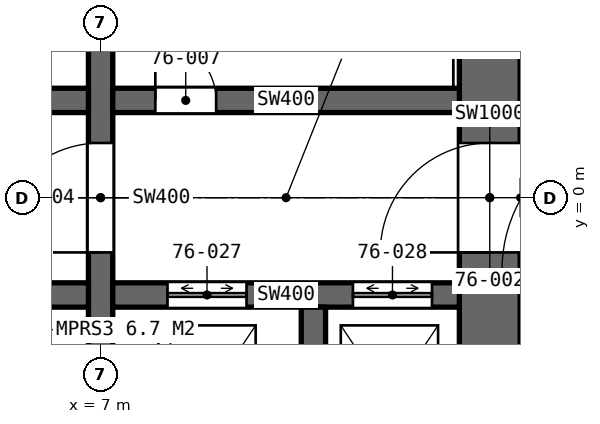
"""IFC4 building model, lengths in metres.
Left out: names, types, materials, properties, quantities, classifications, styles, units other than length and angle.
Written with IfcOpenShell. Run it as: python <this file> out.ifc"""

import sys

from ifc_helpers import new_model, si_unit, direction, frame, frame_2d, origin, place, context, subcontext, project, spatial, rectangle, extrude, element, fill, save


model = new_model("IFC4")
c1 = context("Model", 3, precision=1e-05, world=origin(), true_north=direction((0.0, 1.0)))
c2 = subcontext(c1, "Body", "Model", "MODEL_VIEW")
j1 = project(units=[si_unit("LENGTHUNIT", "METRE"), si_unit("PLANEANGLEUNIT", "RADIAN")], contexts=[c1])
p1 = place(None, origin())
s1 = spatial("IfcSite", under=j1, at=p1, CompositionType="ELEMENT")
p2 = place(p1, origin())
s2 = spatial("IfcBuilding", under=s1, at=p2, CompositionType="ELEMENT")
p3 = place(p2, frame((0.0, 0.0, 339.2)))
s3 = spatial("IfcBuildingStorey", under=s2, at=p3, CompositionType="ELEMENT", Elevation=339.2)
p4 = place(p3, frame((13.4, -8.9, 0.0), z_axis=(0.0, 0.0, 1.0), x_axis=(0.0, 1.0, 0.0)))
e1 = element("IfcWall", 1, at=p4, inside=s3, PredefinedType="SHEAR", context=c2, shape_type="SweptSolid", body=[
    extrude(rectangle(XDim=17.8, YDim=1.0, at=frame_2d((8.9, 0.0))), origin(), (0.0, 0.0, 1.0), 5.0),
])
p5 = place(p4, frame((8.0, 0.0, 0.0)))
e2 = element("IfcOpeningElement", 2, at=p5, cuts=e1, PredefinedType="OPENING", context=c2, shape_type="SweptSolid", body=[
    extrude(rectangle(XDim=1.8, YDim=2.4, at=frame_2d((0.9, 1.2))), frame((0.0, 0.51, 0.0), z_axis=(0.0, -1.0, 0.0), x_axis=(1.0, 0.0, 0.0)), (0.0, 0.0, 1.0), 1.02),
])
p6 = place(p3, frame((7.0, -8.9, 0.0), z_axis=(0.0, 0.0, 1.0), x_axis=(0.0, 1.0, 0.0)))
e3 = element("IfcWall", 3, at=p6, inside=s3, PredefinedType="SHEAR", context=c2, shape_type="SweptSolid", body=[
    extrude(rectangle(XDim=17.8, YDim=0.4, at=frame_2d((8.9, 0.0))), origin(), (0.0, 0.0, 1.0), 5.0),
])
p7 = place(p6, frame((8.0, 0.0, 0.0)))
e4 = element("IfcOpeningElement", 4, at=p7, cuts=e3, PredefinedType="OPENING", context=c2, shape_type="SweptSolid", body=[
    extrude(rectangle(XDim=1.8, YDim=2.4, at=frame_2d((0.9, 1.2))), frame((0.0, 0.21, 0.0), z_axis=(0.0, -1.0, 0.0), x_axis=(1.0, 0.0, 0.0)), (0.0, 0.0, 1.0), 0.42),
])
p8 = place(p3, frame((-6.8, 1.6, 0.0), z_axis=(0.0, 0.0, 1.0), x_axis=(1.0, 0.0, 0.0)))
e5 = element("IfcWall", 5, at=p8, inside=s3, PredefinedType="SHEAR", context=c2, shape_type="SweptSolid", body=[
    extrude(rectangle(XDim=13.6, YDim=0.4, at=frame_2d((6.8, 0.0))), origin(), (0.0, 0.0, 1.0), 5.0),
])
p9 = place(p8, frame((0.765, 0.0, 0.0)))
e6 = element("IfcOpeningElement", 6, at=p9, cuts=e5, PredefinedType="OPENING", context=c2, shape_type="SweptSolid", body=[
    extrude(rectangle(XDim=1.0, YDim=2.4, at=frame_2d((0.5, 1.2))), frame((0.0, 0.21, 0.0), z_axis=(0.0, -1.0, 0.0), x_axis=(1.0, 0.0, 0.0)), (0.0, 0.0, 1.0), 0.42),
])
p10 = place(p8, frame((3.5, 0.0, 0.0)))
e7 = element("IfcOpeningElement", 7, at=p10, cuts=e5, PredefinedType="OPENING", context=c2, shape_type="SweptSolid", body=[
    extrude(rectangle(XDim=1.0, YDim=2.4, at=frame_2d((0.5, 1.2))), frame((0.0, 0.21, 0.0), z_axis=(0.0, -1.0, 0.0), x_axis=(1.0, 0.0, 0.0)), (0.0, 0.0, 1.0), 0.42),
])
p11 = place(p8, frame((6.3, 0.0, 0.0)))
e8 = element("IfcOpeningElement", 8, at=p11, cuts=e5, PredefinedType="OPENING", context=c2, shape_type="SweptSolid", body=[
    extrude(rectangle(XDim=1.0, YDim=2.4, at=frame_2d((0.5, 1.2))), frame((0.0, 0.21, 0.0), z_axis=(0.0, -1.0, 0.0), x_axis=(1.0, 0.0, 0.0)), (0.0, 0.0, 1.0), 0.42),
])
p12 = place(p8, frame((9.035, 0.0, 0.0)))
e9 = element("IfcOpeningElement", 9, at=p12, cuts=e5, PredefinedType="OPENING", context=c2, shape_type="SweptSolid", body=[
    extrude(rectangle(XDim=1.0, YDim=2.4, at=frame_2d((0.5, 1.2))), frame((0.0, 0.21, 0.0), z_axis=(0.0, -1.0, 0.0), x_axis=(1.0, 0.0, 0.0)), (0.0, 0.0, 1.0), 0.42),
])
p13 = place(p8, frame((11.9, 0.0, 0.0)))
e10 = element("IfcOpeningElement", 10, at=p13, cuts=e5, PredefinedType="OPENING", context=c2, shape_type="SweptSolid", body=[
    extrude(rectangle(XDim=1.0, YDim=2.4, at=frame_2d((0.5, 1.2))), frame((0.0, 0.21, 0.0), z_axis=(0.0, -1.0, 0.0), x_axis=(1.0, 0.0, 0.0)), (0.0, 0.0, 1.0), 0.42),
])
p14 = place(p3, frame((-6.8, -1.6, 0.0), z_axis=(0.0, 0.0, 1.0), x_axis=(1.0, 0.0, 0.0)))
e11 = element("IfcWall", 11, at=p14, inside=s3, PredefinedType="SHEAR", context=c2, shape_type="SweptSolid", body=[
    extrude(rectangle(XDim=13.6, YDim=0.4, at=frame_2d((6.8, 0.0))), origin(), (0.0, 0.0, 1.0), 5.0),
])
p15 = place(p14, frame((0.765, 0.0, 0.0)))
e12 = element("IfcOpeningElement", 12, at=p15, cuts=e11, PredefinedType="OPENING", context=c2, shape_type="SweptSolid", body=[
    extrude(rectangle(XDim=1.0, YDim=2.4, at=frame_2d((0.5, 1.2))), frame((0.0, 0.21, 0.0), z_axis=(0.0, -1.0, 0.0), x_axis=(1.0, 0.0, 0.0)), (0.0, 0.0, 1.0), 0.42),
])
p16 = place(p14, frame((3.5, 0.0, 0.0)))
e13 = element("IfcOpeningElement", 13, at=p16, cuts=e11, PredefinedType="OPENING", context=c2, shape_type="SweptSolid", body=[
    extrude(rectangle(XDim=1.0, YDim=2.4, at=frame_2d((0.5, 1.2))), frame((0.0, 0.21, 0.0), z_axis=(0.0, -1.0, 0.0), x_axis=(1.0, 0.0, 0.0)), (0.0, 0.0, 1.0), 0.42),
])
p17 = place(p14, frame((6.3, 0.0, 0.0)))
e14 = element("IfcOpeningElement", 14, at=p17, cuts=e11, PredefinedType="OPENING", context=c2, shape_type="SweptSolid", body=[
    extrude(rectangle(XDim=1.0, YDim=2.4, at=frame_2d((0.5, 1.2))), frame((0.0, 0.21, 0.0), z_axis=(0.0, -1.0, 0.0), x_axis=(1.0, 0.0, 0.0)), (0.0, 0.0, 1.0), 0.42),
])
p18 = place(p14, frame((9.035, 0.0, 0.0)))
e15 = element("IfcOpeningElement", 15, at=p18, cuts=e11, PredefinedType="OPENING", context=c2, shape_type="SweptSolid", body=[
    extrude(rectangle(XDim=1.0, YDim=2.4, at=frame_2d((0.5, 1.2))), frame((0.0, 0.21, 0.0), z_axis=(0.0, -1.0, 0.0), x_axis=(1.0, 0.0, 0.0)), (0.0, 0.0, 1.0), 0.42),
])
p19 = place(p14, frame((11.9, 0.0, 0.0)))
e16 = element("IfcOpeningElement", 16, at=p19, cuts=e11, PredefinedType="OPENING", context=c2, shape_type="SweptSolid", body=[
    extrude(rectangle(XDim=1.0, YDim=2.4, at=frame_2d((0.5, 1.2))), frame((0.0, 0.21, 0.0), z_axis=(0.0, -1.0, 0.0), x_axis=(1.0, 0.0, 0.0)), (0.0, 0.0, 1.0), 0.42),
])
p20 = place(p3, frame((7.2, 1.6, 0.0), z_axis=(0.0, 0.0, 1.0), x_axis=(1.0, 0.0, 0.0)))
e17 = element("IfcWall", 17, at=p20, inside=s3, PredefinedType="SHEAR", context=c2, shape_type="SweptSolid", body=[
    extrude(rectangle(XDim=5.7, YDim=0.4, at=frame_2d((2.85, 0.0))), origin(), (0.0, 0.0, 1.0), 5.0),
])
p21 = place(p20, frame((0.7, 0.0, 0.0)))
e18 = element("IfcOpeningElement", 18, at=p21, cuts=e17, PredefinedType="OPENING", context=c2, shape_type="SweptSolid", body=[
    extrude(rectangle(XDim=1.0, YDim=2.4, at=frame_2d((0.5, 1.2))), frame((0.0, 0.21, 0.0), z_axis=(0.0, -1.0, 0.0), x_axis=(1.0, 0.0, 0.0)), (0.0, 0.0, 1.0), 0.42),
])
p22 = place(p3, frame((7.2, -1.6, 0.0), z_axis=(0.0, 0.0, 1.0), x_axis=(1.0, 0.0, 0.0)))
e19 = element("IfcWall", 19, at=p22, inside=s3, PredefinedType="SHEAR", context=c2, shape_type="SweptSolid", body=[
    extrude(rectangle(XDim=5.7, YDim=0.4, at=frame_2d((2.85, 0.0))), origin(), (0.0, 0.0, 1.0), 5.0),
])
p23 = place(p22, frame((0.9, 0.0, 0.0)))
e20 = element("IfcOpeningElement", 20, at=p23, cuts=e19, PredefinedType="OPENING", context=c2, shape_type="SweptSolid", body=[
    extrude(rectangle(XDim=1.3, YDim=2.4, at=frame_2d((0.65, 1.2))), frame((0.0, 0.21, 0.0), z_axis=(0.0, -1.0, 0.0), x_axis=(1.0, 0.0, 0.0)), (0.0, 0.0, 1.0), 0.42),
])
p24 = place(p22, frame((3.95, 0.0, 0.0)))
e21 = element("IfcOpeningElement", 21, at=p24, cuts=e19, PredefinedType="OPENING", context=c2, shape_type="SweptSolid", body=[
    extrude(rectangle(XDim=1.3, YDim=2.4, at=frame_2d((0.65, 1.2))), frame((0.0, 0.21, 0.0), z_axis=(0.0, -1.0, 0.0), x_axis=(1.0, 0.0, 0.0)), (0.0, 0.0, 1.0), 0.42),
])
p25 = place(p3, frame((10.5, -4.8, 0.0), z_axis=(0.0, 0.0, 1.0), x_axis=(0.0, 1.0, 0.0)))
e22 = element("IfcWall", 22, at=p25, inside=s3, PredefinedType="SHEAR", context=c2, shape_type="SweptSolid", body=[
    extrude(rectangle(XDim=3.0, YDim=0.4, at=frame_2d((1.5, 0.0))), origin(), (0.0, 0.0, 1.0), 5.0),
])
p26 = place(p5, origin())
e23 = element("IfcDoor", 23, at=p26, inside=s3, OperationType="DOUBLE_DOOR_SINGLE_SWING", PredefinedType="DOOR", context=c2, shape_type="SweptSolid", body=[
    extrude(rectangle(XDim=1.8, YDim=2.4, at=frame_2d((0.9, 1.2))), frame((0.0, 0.025, 0.0), z_axis=(0.0, -1.0, 0.0), x_axis=(1.0, 0.0, 0.0)), (0.0, 0.0, 1.0), 0.05),
])
fill(e2, e23)
p27 = place(p7, origin())
e24 = element("IfcDoor", 24, at=p27, inside=s3, OperationType="DOUBLE_DOOR_SINGLE_SWING", PredefinedType="DOOR", context=c2, shape_type="SweptSolid", body=[
    extrude(rectangle(XDim=1.8, YDim=2.4, at=frame_2d((0.9, 1.2))), frame((0.0, 0.025, 0.0), z_axis=(0.0, -1.0, 0.0), x_axis=(1.0, 0.0, 0.0)), (0.0, 0.0, 1.0), 0.05),
])
fill(e4, e24)
p28 = place(p21, origin())
e25 = element("IfcDoor", 25, at=p28, inside=s3, OperationType="SINGLE_SWING_LEFT", PredefinedType="DOOR", context=c2, shape_type="SweptSolid", body=[
    extrude(rectangle(XDim=1.0, YDim=2.4, at=frame_2d((0.5, 1.2))), frame((0.0, 0.025, 0.0), z_axis=(0.0, -1.0, 0.0), x_axis=(1.0, 0.0, 0.0)), (0.0, 0.0, 1.0), 0.05),
])
fill(e18, e25)
p29 = place(p23, origin())
e26 = element("IfcDoor", 26, at=p29, inside=s3, OperationType="DOUBLE_DOOR_SLIDING", PredefinedType="DOOR", context=c2, shape_type="SweptSolid", body=[
    extrude(rectangle(XDim=1.3, YDim=2.4, at=frame_2d((0.65, 1.2))), frame((0.0, 0.025, 0.0), z_axis=(0.0, -1.0, 0.0), x_axis=(1.0, 0.0, 0.0)), (0.0, 0.0, 1.0), 0.05),
])
fill(e20, e26)
p30 = place(p24, origin())
e27 = element("IfcDoor", 27, at=p30, inside=s3, OperationType="DOUBLE_DOOR_SLIDING", PredefinedType="DOOR", context=c2, shape_type="SweptSolid", body=[
    extrude(rectangle(XDim=1.3, YDim=2.4, at=frame_2d((0.65, 1.2))), frame((0.0, 0.025, 0.0), z_axis=(0.0, -1.0, 0.0), x_axis=(1.0, 0.0, 0.0)), (0.0, 0.0, 1.0), 0.05),
])
fill(e21, e27)
save(model, sys.argv[1])
